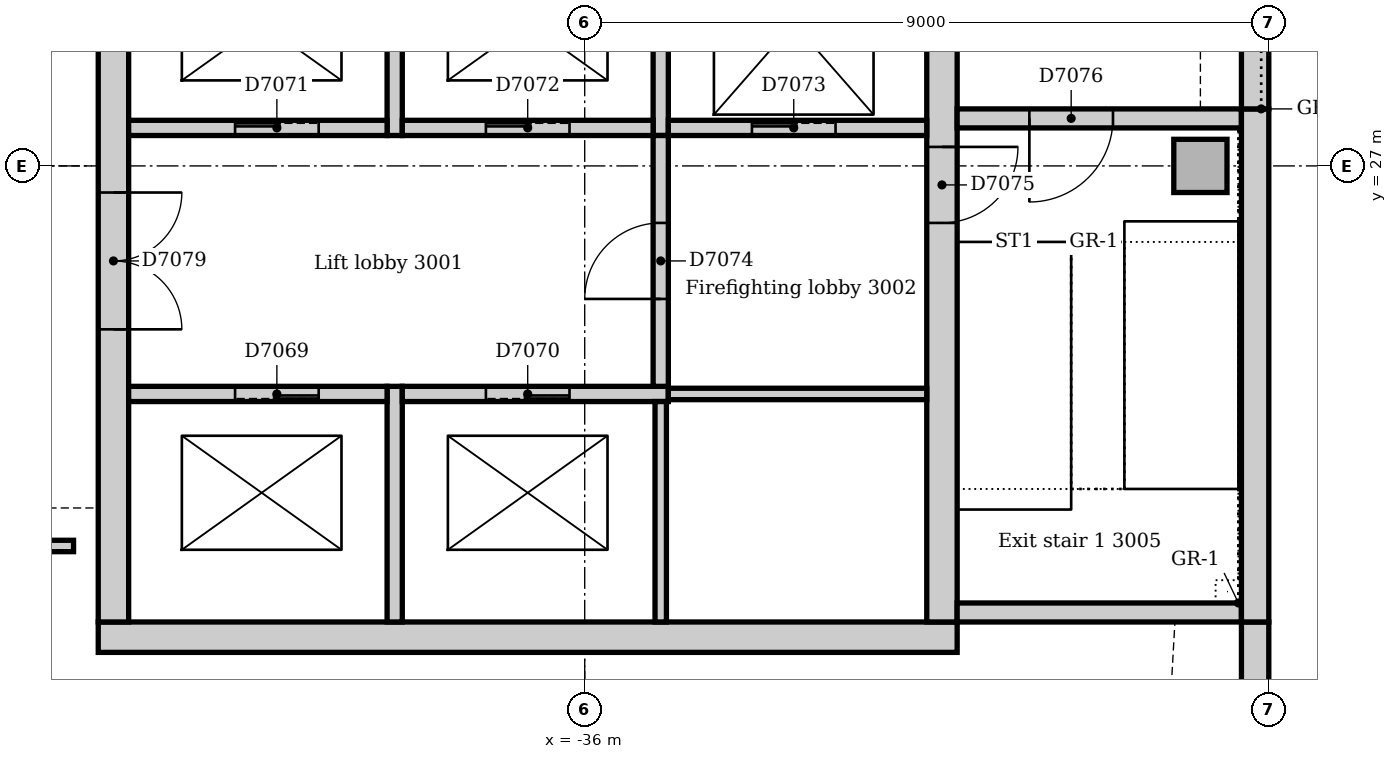
"""IFC4 building model, lengths in metres.
Left out: names, types, materials, properties, quantities, classifications, styles, units other than length and angle.
Written with IfcOpenShell. Run it as: python <this file> out.ifc"""

import sys

from ifc_helpers import new_model, si_unit, direction, frame, frame_2d, origin, origin_2d, place, context, subcontext, project, spatial, rectangle, extrude, element, fill, save


model = new_model("IFC4")
c1 = context("Model", 3, precision=1e-05, world=origin(), true_north=direction((0.0, 1.0)))
c2 = subcontext(c1, "Body", "Model", "MODEL_VIEW")
j1 = project(units=[si_unit("LENGTHUNIT", "METRE"), si_unit("PLANEANGLEUNIT", "RADIAN")], contexts=[c1])
p1 = place(None, origin())
s1 = spatial("IfcSite", under=j1, at=p1, CompositionType="ELEMENT")
p2 = place(p1, origin())
s2 = spatial("IfcBuilding", under=s1, at=p2, CompositionType="ELEMENT")
p3 = place(p2, frame((0.0, 0.0, 128.0)))
s3 = spatial("IfcBuildingStorey", under=s2, at=p3, CompositionType="ELEMENT", Elevation=128.0)
p4 = place(p3, frame((-42.4, 20.8, 0.0), z_axis=(0.0, 0.0, 1.0), x_axis=(1.0, 0.0, 0.0)))
e1 = element("IfcWall", 1, at=p4, inside=s3, PredefinedType="SOLIDWALL", context=c2, shape_type="SweptSolid", body=[
    extrude(rectangle(XDim=11.3, YDim=0.4, at=frame_2d((5.65, 0.0))), origin(), (0.0, 0.0, 1.0), 4.0),
])
p5 = place(p3, frame((-31.3, 21.0, 0.0), z_axis=(0.0, 0.0, 1.0), x_axis=(0.0, 1.0, 0.0)))
e2 = element("IfcWall", 2, at=p5, inside=s3, PredefinedType="SOLIDWALL", context=c2, shape_type="SweptSolid", body=[
    extrude(rectangle(XDim=9.5, YDim=0.4, at=frame_2d((4.75, 0.0))), origin(), (0.0, 0.0, 1.0), 4.0),
])
p6 = place(p5, frame((5.25, 0.0, 0.0)))
e3 = element("IfcOpeningElement", 3, at=p6, cuts=e2, PredefinedType="OPENING", context=c2, shape_type="SweptSolid", body=[
    extrude(rectangle(XDim=1.0, YDim=2.1, at=frame_2d((0.5, 1.05))), frame((0.0, 0.21, 0.0), z_axis=(0.0, -1.0, 0.0), x_axis=(1.0, 0.0, 0.0)), (0.0, 0.0, 1.0), 0.42),
])
p7 = place(p3, frame((-42.2, 30.5, 0.0), z_axis=(0.0, 0.0, 1.0), x_axis=(0.0, -1.0, 0.0)))
e4 = element("IfcWall", 4, at=p7, inside=s3, PredefinedType="SOLIDWALL", context=c2, shape_type="SweptSolid", body=[
    extrude(rectangle(XDim=9.5, YDim=0.4, at=frame_2d((4.75, 0.0))), origin(), (0.0, 0.0, 1.0), 4.0),
])
p8 = place(p7, frame((3.85, 0.0, 0.0)))
e5 = element("IfcOpeningElement", 5, at=p8, cuts=e4, PredefinedType="OPENING", context=c2, shape_type="SweptSolid", body=[
    extrude(rectangle(XDim=1.8, YDim=2.1, at=frame_2d((0.9, 1.05))), frame((0.0, 0.21, 0.0), z_axis=(0.0, -1.0, 0.0), x_axis=(1.0, 0.0, 0.0)), (0.0, 0.0, 1.0), 0.42),
])
p9 = place(p3, frame((-31.1, 21.125, 0.0), z_axis=(0.0, 0.0, 1.0), x_axis=(1.0, 0.0, 0.0)))
e6 = element("IfcWall", 6, at=p9, inside=s3, PredefinedType="SOLIDWALL", context=c2, shape_type="SweptSolid", body=[
    extrude(rectangle(XDim=3.74, YDim=0.25, at=frame_2d((1.87, 0.0))), origin(), (0.0, 0.0, 1.0), 4.0),
])
p10 = place(p3, frame((-27.36, 27.625, 0.0), z_axis=(0.0, 0.0, 1.0), x_axis=(-1.0, 0.0, 0.0)))
e7 = element("IfcWall", 7, at=p10, inside=s3, PredefinedType="SOLIDWALL", context=c2, shape_type="SweptSolid", body=[
    extrude(rectangle(XDim=3.74, YDim=0.25, at=frame_2d((1.87, 0.0))), origin(), (0.0, 0.0, 1.0), 4.0),
])
p11 = place(p10, frame((1.69, 0.0, 0.0)))
e8 = element("IfcOpeningElement", 8, at=p11, cuts=e7, PredefinedType="OPENING", context=c2, shape_type="SweptSolid", body=[
    extrude(rectangle(XDim=1.1, YDim=2.1, at=frame_2d((0.55, 1.05))), frame((0.0, 0.135, 0.0), z_axis=(0.0, -1.0, 0.0), x_axis=(1.0, 0.0, 0.0)), (0.0, 0.0, 1.0), 0.27),
])
p12 = place(p3, frame((-27.9, 27.0, 0.0), z_axis=(0.0, 0.0, 1.0), x_axis=(1.0, 0.0, 0.0)))
e9 = element("IfcColumn", 9, at=p12, inside=s3, PredefinedType="COLUMN", context=c2, shape_type="SweptSolid", body=[
    extrude(rectangle(XDim=0.7, YDim=0.7, at=origin_2d()), origin(), (0.0, 0.0, 1.0), 4.0),
])
p13 = place(p3, frame((-27.18, 17.743, 0.0), z_axis=(0.0, 0.0, 1.0), x_axis=(0.0, 1.0, 0.0)))
e10 = element("IfcWall", 10, at=p13, inside=s3, PredefinedType="STANDARD", context=c2, shape_type="SweptSolid", body=[
    extrude(rectangle(XDim=3.257, YDim=0.36, at=frame_2d((1.629, 0.0))), origin(), (0.0, 0.0, 1.0), 3.85),
])
p14 = place(p3, frame((-27.18, 21.0, 0.0), z_axis=(0.0, 0.0, 1.0), x_axis=(0.0, 1.0, 0.0)))
e11 = element("IfcWall", 11, at=p14, inside=s3, PredefinedType="STANDARD", context=c2, shape_type="SweptSolid", body=[
    extrude(rectangle(XDim=6.75, YDim=0.36, at=frame_2d((3.375, 0.0))), origin(), (0.0, 0.0, 1.0), 3.85),
])
p15 = place(p3, frame((-27.18, 27.75, 0.0), z_axis=(0.0, 0.0, 1.0), x_axis=(0.0, 1.0, 0.0)))
e12 = element("IfcWall", 12, at=p15, inside=s3, PredefinedType="STANDARD", context=c2, shape_type="SweptSolid", body=[
    extrude(rectangle(XDim=7.5, YDim=0.36, at=frame_2d((3.75, 0.0))), origin(), (0.0, 0.0, 1.0), 3.85),
])
p16 = place(p15, frame((2.85, 0.0, 1.2)))
e13 = element("IfcOpeningElement", 13, at=p16, cuts=e12, PredefinedType="OPENING", context=c2, shape_type="SweptSolid", body=[
    extrude(rectangle(XDim=1.8, YDim=1.2, at=frame_2d((0.9, 0.6))), frame((0.0, 0.19, 0.0), z_axis=(0.0, -1.0, 0.0), x_axis=(1.0, 0.0, 0.0)), (0.0, 0.0, 1.0), 0.38),
])
p17 = place(p3, frame((-38.5, 21.0, 0.0), z_axis=(0.0, 0.0, 1.0), x_axis=(0.0, 1.0, 0.0)))
e14 = element("IfcWall", 14, at=p17, inside=s3, PredefinedType="SOLIDWALL", context=c2, shape_type="SweptSolid", body=[
    extrude(rectangle(XDim=3.1, YDim=0.2, at=frame_2d((1.55, 0.0))), origin(), (0.0, 0.0, 1.0), 4.0),
])
p18 = place(p3, frame((-38.6, 24.0, 0.0), z_axis=(0.0, 0.0, 1.0), x_axis=(-1.0, 0.0, 0.0)))
e15 = element("IfcWall", 15, at=p18, inside=s3, PredefinedType="SOLIDWALL", context=c2, shape_type="SweptSolid", body=[
    extrude(rectangle(XDim=3.4, YDim=0.2, at=frame_2d((1.7, 0.0))), origin(), (0.0, 0.0, 1.0), 4.0),
])
p19 = place(p18, frame((0.9, 0.0, 0.0)))
e16 = element("IfcOpeningElement", 16, at=p19, cuts=e15, PredefinedType="OPENING", context=c2, shape_type="SweptSolid", body=[
    extrude(rectangle(XDim=1.1, YDim=2.1, at=frame_2d((0.55, 1.05))), frame((0.0, 0.11, 0.0), z_axis=(0.0, -1.0, 0.0), x_axis=(1.0, 0.0, 0.0)), (0.0, 0.0, 1.0), 0.22),
])
p20 = place(p3, frame((-34.9, 24.0, 0.0), z_axis=(0.0, 0.0, 1.0), x_axis=(-1.0, 0.0, 0.0)))
e17 = element("IfcWall", 17, at=p20, inside=s3, PredefinedType="SOLIDWALL", context=c2, shape_type="SweptSolid", body=[
    extrude(rectangle(XDim=3.5, YDim=0.2, at=frame_2d((1.75, 0.0))), origin(), (0.0, 0.0, 1.0), 4.0),
])
p21 = place(p20, frame((1.3, 0.0, 0.0)))
e18 = element("IfcOpeningElement", 18, at=p21, cuts=e17, PredefinedType="OPENING", context=c2, shape_type="SweptSolid", body=[
    extrude(rectangle(XDim=1.1, YDim=2.1, at=frame_2d((0.55, 1.05))), frame((0.0, 0.11, 0.0), z_axis=(0.0, -1.0, 0.0), x_axis=(1.0, 0.0, 0.0)), (0.0, 0.0, 1.0), 0.22),
])
p22 = place(p3, frame((-38.5, 27.4, 0.0), z_axis=(0.0, 0.0, 1.0), x_axis=(0.0, 1.0, 0.0)))
e19 = element("IfcWall", 19, at=p22, inside=s3, PredefinedType="SOLIDWALL", context=c2, shape_type="SweptSolid", body=[
    extrude(rectangle(XDim=2.85, YDim=0.2, at=frame_2d((1.425, 0.0))), origin(), (0.0, 0.0, 1.0), 4.0),
])
p23 = place(p3, frame((-42.0, 27.5, 0.0), z_axis=(0.0, 0.0, 1.0), x_axis=(1.0, 0.0, 0.0)))
e20 = element("IfcWall", 20, at=p23, inside=s3, PredefinedType="SOLIDWALL", context=c2, shape_type="SweptSolid", body=[
    extrude(rectangle(XDim=3.4, YDim=0.2, at=frame_2d((1.7, 0.0))), origin(), (0.0, 0.0, 1.0), 4.0),
])
p24 = place(p23, frame((1.4, 0.0, 0.0)))
e21 = element("IfcOpeningElement", 21, at=p24, cuts=e20, PredefinedType="OPENING", context=c2, shape_type="SweptSolid", body=[
    extrude(rectangle(XDim=1.1, YDim=2.1, at=frame_2d((0.55, 1.05))), frame((0.0, 0.11, 0.0), z_axis=(0.0, -1.0, 0.0), x_axis=(1.0, 0.0, 0.0)), (0.0, 0.0, 1.0), 0.22),
])
p25 = place(p3, frame((-35.0, 27.4, 0.0), z_axis=(0.0, 0.0, 1.0), x_axis=(0.0, 1.0, 0.0)))
e22 = element("IfcWall", 22, at=p25, inside=s3, PredefinedType="SOLIDWALL", context=c2, shape_type="SweptSolid", body=[
    extrude(rectangle(XDim=2.85, YDim=0.2, at=frame_2d((1.425, 0.0))), origin(), (0.0, 0.0, 1.0), 4.0),
])
p26 = place(p3, frame((-38.4, 27.5, 0.0), z_axis=(0.0, 0.0, 1.0), x_axis=(1.0, 0.0, 0.0)))
e23 = element("IfcWall", 23, at=p26, inside=s3, PredefinedType="SOLIDWALL", context=c2, shape_type="SweptSolid", body=[
    extrude(rectangle(XDim=3.3, YDim=0.2, at=frame_2d((1.65, 0.0))), origin(), (0.0, 0.0, 1.0), 4.0),
])
p27 = place(p26, frame((1.1, 0.0, 0.0)))
e24 = element("IfcOpeningElement", 24, at=p27, cuts=e23, PredefinedType="OPENING", context=c2, shape_type="SweptSolid", body=[
    extrude(rectangle(XDim=1.1, YDim=2.1, at=frame_2d((0.55, 1.05))), frame((0.0, 0.11, 0.0), z_axis=(0.0, -1.0, 0.0), x_axis=(1.0, 0.0, 0.0)), (0.0, 0.0, 1.0), 0.22),
])
p28 = place(p3, frame((-34.9, 27.5, 0.0), z_axis=(0.0, 0.0, 1.0), x_axis=(1.0, 0.0, 0.0)))
e25 = element("IfcWall", 25, at=p28, inside=s3, PredefinedType="SOLIDWALL", context=c2, shape_type="SweptSolid", body=[
    extrude(rectangle(XDim=3.4, YDim=0.2, at=frame_2d((1.7, 0.0))), origin(), (0.0, 0.0, 1.0), 4.0),
])
p29 = place(p28, frame((1.1, 0.0, 0.0)))
e26 = element("IfcOpeningElement", 26, at=p29, cuts=e25, PredefinedType="OPENING", context=c2, shape_type="SweptSolid", body=[
    extrude(rectangle(XDim=1.1, YDim=2.1, at=frame_2d((0.55, 1.05))), frame((0.0, 0.11, 0.0), z_axis=(0.0, -1.0, 0.0), x_axis=(1.0, 0.0, 0.0)), (0.0, 0.0, 1.0), 0.22),
])
p30 = place(p3, frame((-35.0, 24.1, 0.0), z_axis=(0.0, 0.0, 1.0), x_axis=(0.0, 1.0, 0.0)))
e27 = element("IfcWall", 27, at=p30, inside=s3, PredefinedType="SOLIDWALL", context=c2, shape_type="SweptSolid", body=[
    extrude(rectangle(XDim=3.3, YDim=0.2, at=frame_2d((1.65, 0.0))), origin(), (0.0, 0.0, 1.0), 4.0),
])
p31 = place(p30, frame((1.15, 0.0, 0.0)))
e28 = element("IfcOpeningElement", 28, at=p31, cuts=e27, PredefinedType="OPENING", context=c2, shape_type="SweptSolid", body=[
    extrude(rectangle(XDim=1.0, YDim=2.1, at=frame_2d((0.5, 1.05))), frame((0.0, 0.11, 0.0), z_axis=(0.0, -1.0, 0.0), x_axis=(1.0, 0.0, 0.0)), (0.0, 0.0, 1.0), 0.22),
])
p32 = place(p3, frame((-35.0, 21.0, 0.0), z_axis=(0.0, 0.0, 1.0), x_axis=(0.0, 1.0, 0.0)))
e29 = element("IfcWall", 29, at=p32, inside=s3, PredefinedType="SOLIDWALL", context=c2, shape_type="SweptSolid", body=[
    extrude(rectangle(XDim=2.9, YDim=0.15, at=frame_2d((1.45, 0.0))), origin(), (0.0, 0.0, 1.0), 4.0),
])
p33 = place(p3, frame((-31.5, 24.0, 0.0), z_axis=(0.0, 0.0, 1.0), x_axis=(-1.0, 0.0, 0.0)))
e30 = element("IfcWall", 30, at=p33, inside=s3, PredefinedType="SOLIDWALL", context=c2, shape_type="SweptSolid", body=[
    extrude(rectangle(XDim=3.4, YDim=0.15, at=frame_2d((1.7, 0.0))), origin(), (0.0, 0.0, 1.0), 4.0),
])
p34 = place(p3, frame((-59.766, 22.0, 0.0), z_axis=(0.0, 0.0, 1.0), x_axis=(1.0, 0.0, 0.0)))
e31 = element("IfcWall", 31, at=p34, inside=s3, PredefinedType="PARTITIONING", context=c2, shape_type="SweptSolid", body=[
    extrude(rectangle(XDim=17.041, YDim=0.15, at=frame_2d((8.52, 0.0))), origin(), (0.0, 0.0, 1.0), 3.85),
])
p35 = place(p34, frame((15.366, 0.0, 0.0)))
e32 = element("IfcOpeningElement", 32, at=p35, cuts=e31, PredefinedType="OPENING", context=c2, shape_type="SweptSolid", body=[
    extrude(rectangle(XDim=0.9, YDim=2.1, at=frame_2d((0.45, 1.05))), frame((0.0, 0.085, 0.0), z_axis=(0.0, -1.0, 0.0), x_axis=(1.0, 0.0, 0.0)), (0.0, 0.0, 1.0), 0.17),
])
p36 = place(p34, frame((2.5, 0.0, 0.0)))
e33 = element("IfcOpeningElement", 33, at=p36, cuts=e31, PredefinedType="OPENING", context=c2, shape_type="SweptSolid", body=[
    extrude(rectangle(XDim=0.9, YDim=2.1, at=frame_2d((0.45, 1.05))), frame((0.0, 0.085, 0.0), z_axis=(0.0, -1.0, 0.0), x_axis=(1.0, 0.0, 0.0)), (0.0, 0.0, 1.0), 0.17),
])
p37 = place(p34, frame((9.056, 0.0, 0.0)))
e34 = element("IfcOpeningElement", 34, at=p37, cuts=e31, PredefinedType="OPENING", context=c2, shape_type="SweptSolid", body=[
    extrude(rectangle(XDim=1.0, YDim=2.1, at=frame_2d((0.5, 1.05))), frame((0.0, 0.085, 0.0), z_axis=(0.0, -1.0, 0.0), x_axis=(1.0, 0.0, 0.0)), (0.0, 0.0, 1.0), 0.17),
])
p38 = place(p19, origin())
e35 = element("IfcDoor", 35, at=p38, inside=s3, OperationType="SLIDING_TO_LEFT", PredefinedType="DOOR", context=c2, shape_type="SweptSolid", body=[
    extrude(rectangle(XDim=1.1, YDim=2.1, at=frame_2d((0.55, 1.05))), frame((0.0, 0.025, 0.0), z_axis=(0.0, -1.0, 0.0), x_axis=(1.0, 0.0, 0.0)), (0.0, 0.0, 1.0), 0.05),
])
fill(e16, e35)
p39 = place(p21, origin())
e36 = element("IfcDoor", 36, at=p39, inside=s3, OperationType="SLIDING_TO_LEFT", PredefinedType="DOOR", context=c2, shape_type="SweptSolid", body=[
    extrude(rectangle(XDim=1.1, YDim=2.1, at=frame_2d((0.55, 1.05))), frame((0.0, 0.025, 0.0), z_axis=(0.0, -1.0, 0.0), x_axis=(1.0, 0.0, 0.0)), (0.0, 0.0, 1.0), 0.05),
])
fill(e18, e36)
p40 = place(p24, origin())
e37 = element("IfcDoor", 37, at=p40, inside=s3, OperationType="SLIDING_TO_LEFT", PredefinedType="DOOR", context=c2, shape_type="SweptSolid", body=[
    extrude(rectangle(XDim=1.1, YDim=2.1, at=frame_2d((0.55, 1.05))), frame((0.0, 0.025, 0.0), z_axis=(0.0, -1.0, 0.0), x_axis=(1.0, 0.0, 0.0)), (0.0, 0.0, 1.0), 0.05),
])
fill(e21, e37)
p41 = place(p27, origin())
e38 = element("IfcDoor", 38, at=p41, inside=s3, OperationType="SLIDING_TO_LEFT", PredefinedType="DOOR", context=c2, shape_type="SweptSolid", body=[
    extrude(rectangle(XDim=1.1, YDim=2.1, at=frame_2d((0.55, 1.05))), frame((0.0, 0.025, 0.0), z_axis=(0.0, -1.0, 0.0), x_axis=(1.0, 0.0, 0.0)), (0.0, 0.0, 1.0), 0.05),
])
fill(e24, e38)
p42 = place(p29, origin())
e39 = element("IfcDoor", 39, at=p42, inside=s3, OperationType="SLIDING_TO_LEFT", PredefinedType="DOOR", context=c2, shape_type="SweptSolid", body=[
    extrude(rectangle(XDim=1.1, YDim=2.1, at=frame_2d((0.55, 1.05))), frame((0.0, 0.025, 0.0), z_axis=(0.0, -1.0, 0.0), x_axis=(1.0, 0.0, 0.0)), (0.0, 0.0, 1.0), 0.05),
])
fill(e26, e39)
p43 = place(p31, origin())
e40 = element("IfcDoor", 40, at=p43, inside=s3, OperationType="SINGLE_SWING_LEFT", PredefinedType="DOOR", context=c2, shape_type="SweptSolid", body=[
    extrude(rectangle(XDim=1.0, YDim=2.1, at=frame_2d((0.5, 1.05))), frame((0.0, 0.025, 0.0), z_axis=(0.0, -1.0, 0.0), x_axis=(1.0, 0.0, 0.0)), (0.0, 0.0, 1.0), 0.05),
])
fill(e28, e40)
p44 = place(p6, frame((1.0, 0.0, 0.0), z_axis=(0.0, 0.0, 1.0), x_axis=(-1.0, 0.0, 0.0)))
e41 = element("IfcDoor", 41, at=p44, inside=s3, OperationType="SINGLE_SWING_LEFT", PredefinedType="DOOR", context=c2, shape_type="SweptSolid", body=[
    extrude(rectangle(XDim=1.0, YDim=2.1, at=frame_2d((0.5, 1.05))), frame((0.0, 0.025, 0.0), z_axis=(0.0, -1.0, 0.0), x_axis=(1.0, 0.0, 0.0)), (0.0, 0.0, 1.0), 0.05),
])
fill(e3, e41)
p45 = place(p11, origin())
e42 = element("IfcDoor", 42, at=p45, inside=s3, OperationType="SINGLE_SWING_RIGHT", PredefinedType="DOOR", context=c2, shape_type="SweptSolid", body=[
    extrude(rectangle(XDim=1.1, YDim=2.1, at=frame_2d((0.55, 1.05))), frame((0.0, 0.025, 0.0), z_axis=(0.0, -1.0, 0.0), x_axis=(1.0, 0.0, 0.0)), (0.0, 0.0, 1.0), 0.05),
])
fill(e8, e42)
p46 = place(p8, origin())
e43 = element("IfcDoor", 43, at=p46, inside=s3, OperationType="DOUBLE_DOOR_SINGLE_SWING", PredefinedType="DOOR", context=c2, shape_type="SweptSolid", body=[
    extrude(rectangle(XDim=1.8, YDim=2.1, at=frame_2d((0.9, 1.05))), frame((0.0, 0.025, 0.0), z_axis=(0.0, -1.0, 0.0), x_axis=(1.0, 0.0, 0.0)), (0.0, 0.0, 1.0), 0.05),
])
fill(e5, e43)
save(model, sys.argv[1])
